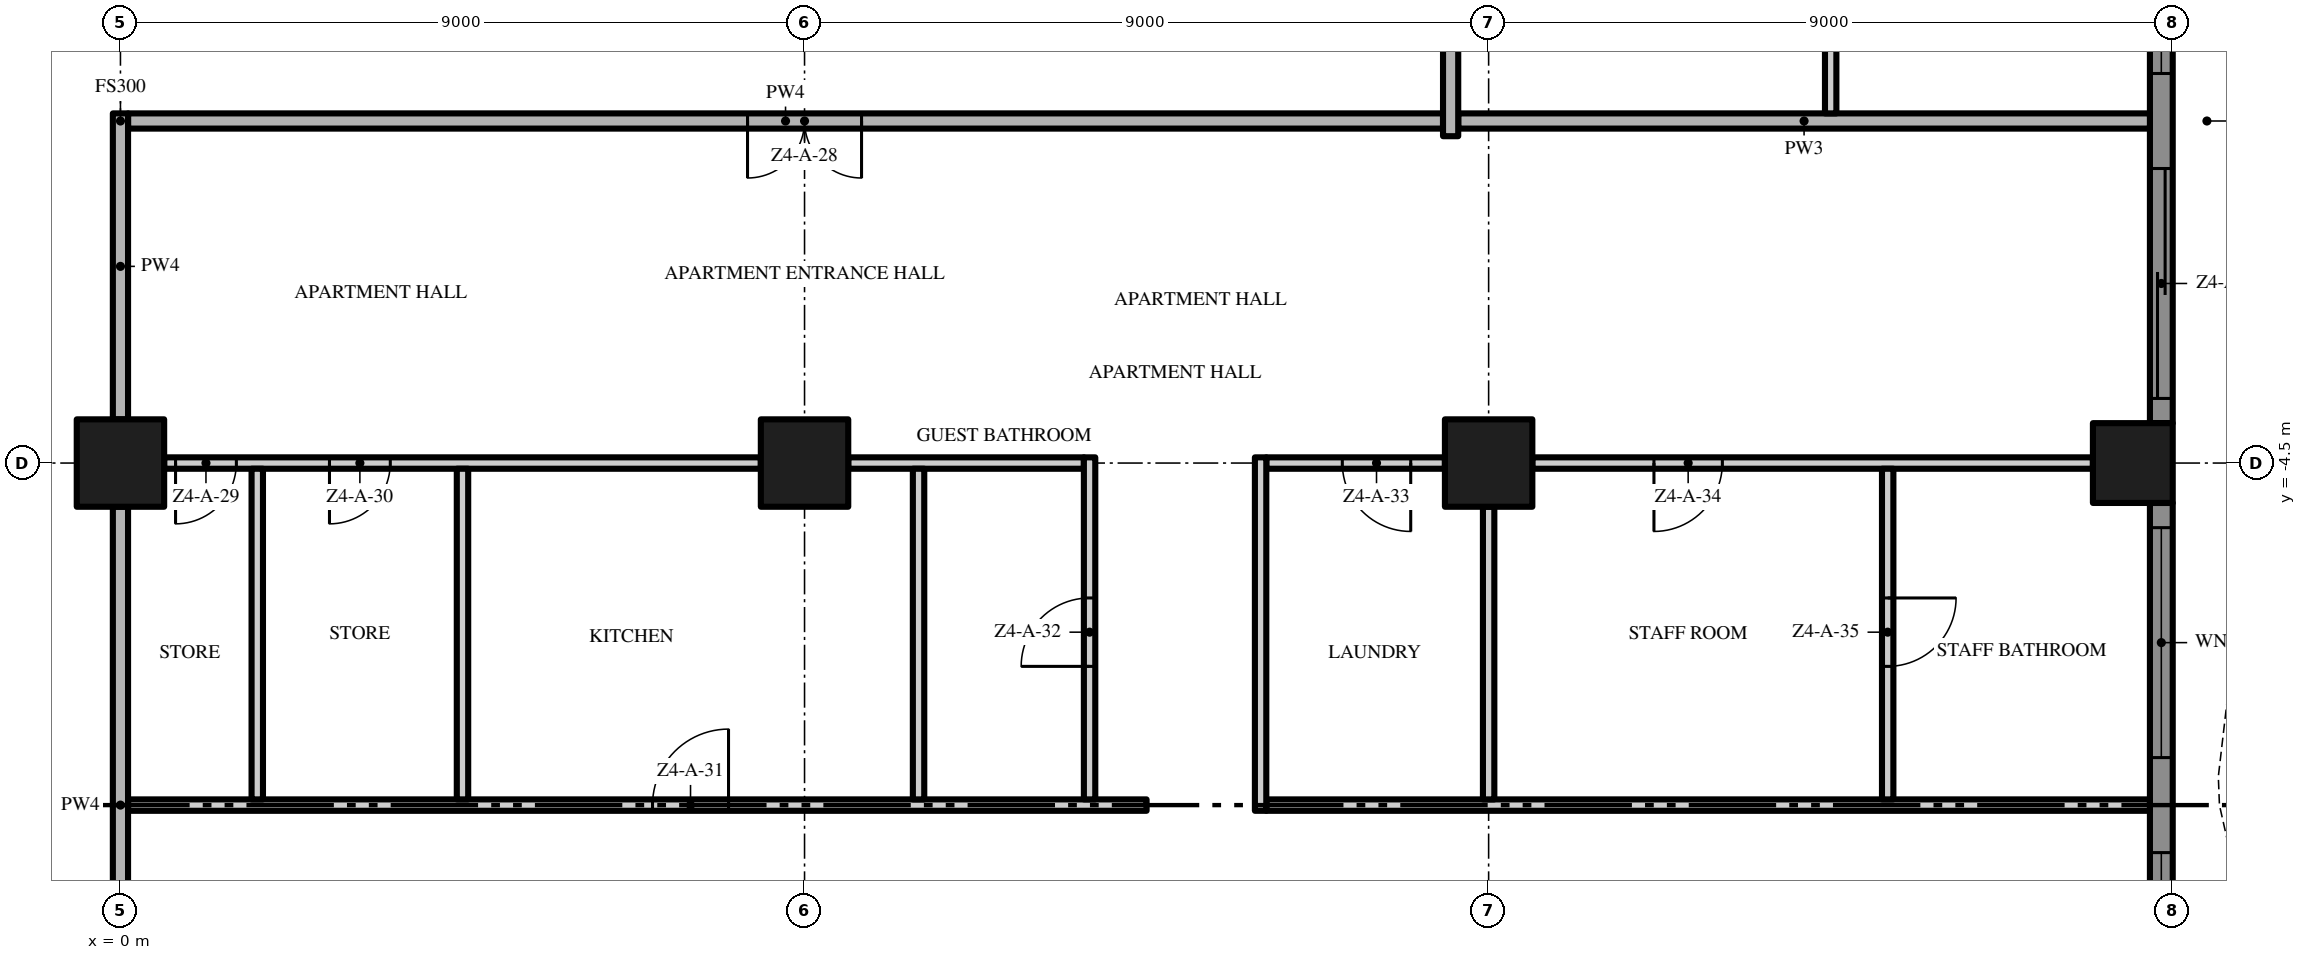
"""IFC4 building model, lengths in metres.
Left out: names, types, materials, properties, quantities, classifications, styles, units other than length and angle.
Written with IfcOpenShell. Run it as: python <this file> out.ifc"""

import sys

from ifc_helpers import new_model, si_unit, direction, frame, frame_2d, origin, origin_2d, place, context, subcontext, project, spatial, polyline, rectangle, outline, extrude, element, fill, save


model = new_model("IFC4")
c1 = context("Model", 3, precision=1e-05, world=origin(), true_north=direction((0.0, 1.0)))
c2 = subcontext(c1, "Body", "Model", "MODEL_VIEW")
j1 = project(units=[si_unit("LENGTHUNIT", "METRE"), si_unit("PLANEANGLEUNIT", "RADIAN")], contexts=[c1])
p1 = place(None, origin())
s1 = spatial("IfcSite", under=j1, at=p1, CompositionType="ELEMENT")
p2 = place(p1, origin())
s2 = spatial("IfcBuilding", under=s1, at=p2, CompositionType="ELEMENT")
p3 = place(p2, frame((0.0, 0.0, 184.4)))
s3 = spatial("IfcBuildingStorey", under=s2, at=p3, CompositionType="ELEMENT", Elevation=184.4)
for number, where, z_axis, x_axis in (
    (1, (0.0, -4.5, 0.0), (0.0, 0.0, 1.0), (1.0, 0.0, 0.0)),
    (2, (18.0, -4.5, 0.0), (0.0, 0.0, 1.0), (1.0, 0.0, 0.0)),
):
    element("IfcColumn", number, at=place(p3, frame(where, z_axis=z_axis, x_axis=x_axis)), inside=s3, PredefinedType="COLUMN", context=c2, shape_type="SweptSolid", body=[
        extrude(rectangle(XDim=1.15, YDim=1.15, at=origin_2d()), origin(), (0.0, 0.0, 1.0), 3.5),
    ])
p4 = place(p3, frame((26.475, -4.5, 0.0), z_axis=(0.0, 0.0, 1.0), x_axis=(1.0, 0.0, 0.0)))
e3 = element("IfcColumn", 3, at=p4, inside=s3, PredefinedType="COLUMN", context=c2, shape_type="SweptSolid", body=[
    extrude(rectangle(XDim=1.05, YDim=1.05, at=origin_2d()), origin(), (0.0, 0.0, 1.0), 3.5),
])
p5 = place(p3, frame((9.0, -4.5, 0.0), z_axis=(0.0, 0.0, 1.0), x_axis=(1.0, 0.0, 0.0)))
e4 = element("IfcColumn", 4, at=p5, inside=s3, PredefinedType="COLUMN", context=c2, shape_type="SweptSolid", body=[
    extrude(rectangle(XDim=1.15, YDim=1.15, at=origin_2d()), origin(), (0.0, 0.0, 1.0), 3.5),
])
p6 = place(p3, frame((26.85, -5.025, 0.0), z_axis=(0.0, 0.0, 1.0), x_axis=(0.0, -1.0, 0.0)))
e5 = element("IfcWall", 5, at=p6, inside=s3, PredefinedType="SOLIDWALL", context=c2, shape_type="SweptSolid", body=[
    extrude(rectangle(XDim=7.95, YDim=0.3, at=frame_2d((3.975, 0.0))), origin(), (0.0, 0.0, 1.0), 3.5),
])
p7 = place(p6, frame((4.6, 0.0, 0.45)))
e6 = element("IfcOpeningElement", 6, at=p7, cuts=e5, PredefinedType="OPENING", context=c2, shape_type="SweptSolid", body=[
    extrude(rectangle(XDim=3.025, YDim=2.65, at=frame_2d((1.512, 1.325))), frame((0.0, 0.16, 0.0), z_axis=(0.0, -1.0, 0.0), x_axis=(1.0, 0.0, 0.0)), (0.0, 0.0, 1.0), 0.32),
])
p8 = place(p6, frame((0.325, 0.0, 0.45)))
e7 = element("IfcOpeningElement", 7, at=p8, cuts=e5, PredefinedType="OPENING", context=c2, shape_type="SweptSolid", body=[
    extrude(rectangle(XDim=3.025, YDim=2.65, at=frame_2d((1.512, 1.325))), frame((0.0, 0.16, 0.0), z_axis=(0.0, -1.0, 0.0), x_axis=(1.0, 0.0, 0.0)), (0.0, 0.0, 1.0), 0.32),
])
p9 = place(p3, frame((26.85, 3.975, 0.0), z_axis=(0.0, 0.0, 1.0), x_axis=(0.0, -1.0, 0.0)))
e8 = element("IfcWall", 8, at=p9, inside=s3, PredefinedType="SOLIDWALL", context=c2, shape_type="SweptSolid", body=[
    extrude(rectangle(XDim=7.95, YDim=0.3, at=frame_2d((3.975, 0.0))), origin(), (0.0, 0.0, 1.0), 3.5),
])
p10 = place(p9, frame((4.6, 0.0, 0.0)))
e9 = element("IfcOpeningElement", 9, at=p10, cuts=e8, PredefinedType="OPENING", context=c2, shape_type="SweptSolid", body=[
    extrude(rectangle(XDim=3.025, YDim=2.4, at=frame_2d((1.512, 1.2))), frame((0.0, 0.16, 0.0), z_axis=(0.0, -1.0, 0.0), x_axis=(1.0, 0.0, 0.0)), (0.0, 0.0, 1.0), 0.32),
])
p11 = place(p9, frame((0.325, 0.0, 0.45)))
e10 = element("IfcOpeningElement", 10, at=p11, cuts=e8, PredefinedType="OPENING", context=c2, shape_type="SweptSolid", body=[
    extrude(rectangle(XDim=3.025, YDim=2.65, at=frame_2d((1.512, 1.325))), frame((0.0, 0.16, 0.0), z_axis=(0.0, -1.0, 0.0), x_axis=(1.0, 0.0, 0.0)), (0.0, 0.0, 1.0), 0.32),
])
p12 = place(p3, origin())
e11 = element("IfcWall", 11, at=p12, inside=s3, PredefinedType="USERDEFINED", context=c2, shape_type="SweptSolid", body=[
    extrude(outline(polyline([(29.649, -18.0), (29.985, -16.5), (30.0, -16.125), (29.869, -15.0), (29.345, -13.5), (28.612, -12.0), (27.951, -10.5), (27.615, -9.0), (27.6, -8.625), (27.731, -7.5), (28.255, -6.0), (28.988, -4.5), (29.649, -3.0), (29.985, -1.5), (30.0, -1.125), (29.869, 0.0), (29.345, 1.5), (28.612, 3.0), (27.951, 4.5), (27.615, 6.0), (27.6, 6.375), (27.731, 7.5), (28.255, 9.0), (28.988, 10.5), (29.649, 12.0), (29.985, 13.5), (30.0, 13.875), (29.869, 15.0), (29.345, 16.5), (28.612, 18.0), (28.388, 17.89), (29.114, 16.404), (29.624, 14.944), (29.749, 13.865), (29.736, 13.533), (29.41, 12.079), (28.761, 10.605), (28.024, 9.096), (27.486, 7.556), (27.349, 6.385), (27.366, 5.967), (27.713, 4.421), (28.385, 2.895), (29.114, 1.404), (29.624, -0.056), (29.749, -1.135), (29.736, -1.467), (29.41, -2.921), (28.761, -4.395), (28.024, -5.904), (27.486, -7.444), (27.349, -8.615), (27.366, -9.033), (27.713, -10.579), (28.385, -12.105), (29.114, -13.596), (29.624, -15.056), (29.749, -16.135), (29.736, -16.467), (29.405, -17.945), (29.649, -18.0)])), origin(), (0.0, 0.0, 1.0), 0.9),
])
p13 = place(p3, frame((0.1, -9.0, 0.0), z_axis=(0.0, 0.0, 1.0), x_axis=(1.0, 0.0, 0.0)))
e12 = element("IfcWall", 12, at=p13, inside=s3, PredefinedType="PARTITIONING", context=c2, shape_type="SweptSolid", body=[
    extrude(rectangle(XDim=13.4, YDim=0.15, at=frame_2d((6.7, 0.0))), origin(), (0.0, 0.0, 1.0), 3.5),
])
p14 = place(p13, frame((6.9, 0.0, 0.0)))
e13 = element("IfcOpeningElement", 13, at=p14, cuts=e12, PredefinedType="OPENING", context=c2, shape_type="SweptSolid", body=[
    extrude(rectangle(XDim=1.0, YDim=2.4, at=frame_2d((0.5, 1.2))), frame((0.0, 0.085, 0.0), z_axis=(0.0, -1.0, 0.0), x_axis=(1.0, 0.0, 0.0)), (0.0, 0.0, 1.0), 0.17),
])
p15 = place(p3, frame((15.075, -9.0, 0.0), z_axis=(0.0, 0.0, 1.0), x_axis=(1.0, 0.0, 0.0)))
e14 = element("IfcWall", 14, at=p15, inside=s3, PredefinedType="PARTITIONING", context=c2, shape_type="SweptSolid", body=[
    extrude(rectangle(XDim=11.625, YDim=0.15, at=frame_2d((5.812, 0.0))), origin(), (0.0, 0.0, 1.0), 3.5),
])
p16 = place(p3, frame((8.425, -4.5, 0.0), z_axis=(0.0, 0.0, 1.0), x_axis=(-1.0, 0.0, 0.0)))
e15 = element("IfcWall", 15, at=p16, inside=s3, PredefinedType="PARTITIONING", context=c2, shape_type="SweptSolid", body=[
    extrude(rectangle(XDim=7.85, YDim=0.15, at=frame_2d((3.925, 0.0))), origin(), (0.0, 0.0, 1.0), 3.5),
])
p17 = place(p16, frame((6.9, 0.0, 0.0)))
e16 = element("IfcOpeningElement", 16, at=p17, cuts=e15, PredefinedType="OPENING", context=c2, shape_type="SweptSolid", body=[
    extrude(rectangle(XDim=0.8, YDim=2.0, at=frame_2d((0.4, 1.0))), frame((0.0, 0.085, 0.0), z_axis=(0.0, -1.0, 0.0), x_axis=(1.0, 0.0, 0.0)), (0.0, 0.0, 1.0), 0.17),
])
p18 = place(p16, frame((4.875, 0.0, 0.0)))
e17 = element("IfcOpeningElement", 17, at=p18, cuts=e15, PredefinedType="OPENING", context=c2, shape_type="SweptSolid", body=[
    extrude(rectangle(XDim=0.8, YDim=2.0, at=frame_2d((0.4, 1.0))), frame((0.0, 0.085, 0.0), z_axis=(0.0, -1.0, 0.0), x_axis=(1.0, 0.0, 0.0)), (0.0, 0.0, 1.0), 0.17),
])
p19 = place(p3, frame((9.575, -4.5, 0.0), z_axis=(0.0, 0.0, 1.0), x_axis=(1.0, 0.0, 0.0)))
e18 = element("IfcWall", 18, at=p19, inside=s3, PredefinedType="PARTITIONING", context=c2, shape_type="SweptSolid", body=[
    extrude(rectangle(XDim=3.1, YDim=0.15, at=frame_2d((1.55, 0.0))), origin(), (0.0, 0.0, 1.0), 3.5),
])
p20 = place(p3, frame((17.425, -4.5, 0.0), z_axis=(0.0, 0.0, 1.0), x_axis=(-1.0, 0.0, 0.0)))
e19 = element("IfcWall", 19, at=p20, inside=s3, PredefinedType="PARTITIONING", context=c2, shape_type="SweptSolid", body=[
    extrude(rectangle(XDim=2.35, YDim=0.15, at=frame_2d((1.175, 0.0))), origin(), (0.0, 0.0, 1.0), 3.5),
])
p21 = place(p20, frame((0.45, 0.0, 0.0)))
e20 = element("IfcOpeningElement", 20, at=p21, cuts=e19, PredefinedType="OPENING", context=c2, shape_type="SweptSolid", body=[
    extrude(rectangle(XDim=0.9, YDim=2.1, at=frame_2d((0.45, 1.05))), frame((0.0, 0.085, 0.0), z_axis=(0.0, -1.0, 0.0), x_axis=(1.0, 0.0, 0.0)), (0.0, 0.0, 1.0), 0.17),
])
p22 = place(p3, frame((25.95, -4.5, 0.0), z_axis=(0.0, 0.0, 1.0), x_axis=(-1.0, 0.0, 0.0)))
e21 = element("IfcWall", 21, at=p22, inside=s3, PredefinedType="PARTITIONING", context=c2, shape_type="SweptSolid", body=[
    extrude(rectangle(XDim=7.375, YDim=0.15, at=frame_2d((3.688, 0.0))), origin(), (0.0, 0.0, 1.0), 3.5),
])
p23 = place(p22, frame((4.875, 0.0, 0.0)))
e22 = element("IfcOpeningElement", 22, at=p23, cuts=e21, PredefinedType="OPENING", context=c2, shape_type="SweptSolid", body=[
    extrude(rectangle(XDim=0.9, YDim=2.1, at=frame_2d((0.45, 1.05))), frame((0.0, 0.085, 0.0), z_axis=(0.0, -1.0, 0.0), x_axis=(1.0, 0.0, 0.0)), (0.0, 0.0, 1.0), 0.17),
])
p24 = place(p3, frame((17.4, 0.0, 0.0), z_axis=(0.0, 0.0, 1.0), x_axis=(-1.0, 0.0, 0.0)))
e23 = element("IfcWall", 23, at=p24, inside=s3, PredefinedType="PARTITIONING", context=c2, shape_type="SweptSolid", body=[
    extrude(rectangle(XDim=17.3, YDim=0.2, at=frame_2d((8.65, 0.0))), origin(), (0.0, 0.0, 1.0), 3.5),
])
p25 = place(p24, frame((7.65, 0.0, 0.0)))
e24 = element("IfcOpeningElement", 24, at=p25, cuts=e23, PredefinedType="OPENING", context=c2, shape_type="SweptSolid", body=[
    extrude(rectangle(XDim=1.5, YDim=2.4, at=frame_2d((0.75, 1.2))), frame((0.0, 0.11, 0.0), z_axis=(0.0, -1.0, 0.0), x_axis=(1.0, 0.0, 0.0)), (0.0, 0.0, 1.0), 0.22),
])
p26 = place(p3, frame((17.6, 0.0, 0.0), z_axis=(0.0, 0.0, 1.0), x_axis=(1.0, 0.0, 0.0)))
e25 = element("IfcWall", 25, at=p26, inside=s3, PredefinedType="PARTITIONING", context=c2, shape_type="SweptSolid", body=[
    extrude(rectangle(XDim=9.1, YDim=0.2, at=frame_2d((4.55, 0.0))), origin(), (0.0, 0.0, 1.0), 3.5),
])
p27 = place(p3, frame((0.0, -12.925, 0.0), z_axis=(0.0, 0.0, 1.0), x_axis=(0.0, 1.0, 0.0)))
e26 = element("IfcWall", 26, at=p27, inside=s3, PredefinedType="PARTITIONING", context=c2, shape_type="SweptSolid", body=[
    extrude(rectangle(XDim=7.85, YDim=0.2, at=frame_2d((3.925, 0.0))), origin(), (0.0, 0.0, 1.0), 3.5),
])
p28 = place(p3, frame((0.0, -3.925, 0.0), z_axis=(0.0, 0.0, 1.0), x_axis=(0.0, 1.0, 0.0)))
e27 = element("IfcWall", 27, at=p28, inside=s3, PredefinedType="PARTITIONING", context=c2, shape_type="SweptSolid", body=[
    extrude(rectangle(XDim=4.025, YDim=0.2, at=frame_2d((2.013, 0.0))), origin(), (0.0, 0.0, 1.0), 3.5),
])
for number, where, z_axis, x_axis in (
    (28, (1.8, -8.925, 0.0), (0.0, 0.0, 1.0), (0.0, 1.0, 0.0)),
    (29, (4.5, -8.925, 0.0), (0.0, 0.0, 1.0), (0.0, 1.0, 0.0)),
    (30, (10.5, -8.925, 0.0), (0.0, 0.0, 1.0), (0.0, 1.0, 0.0)),
):
    element("IfcWall", number, at=place(p3, frame(where, z_axis=z_axis, x_axis=x_axis)), inside=s3, PredefinedType="PARTITIONING", context=c2, shape_type="SweptSolid", body=[
        extrude(rectangle(XDim=4.35, YDim=0.15, at=frame_2d((2.175, 0.0))), origin(), (0.0, 0.0, 1.0), 3.5),
    ])
p29 = place(p3, frame((12.75, -8.925, 0.0), z_axis=(0.0, 0.0, 1.0), x_axis=(0.0, 1.0, 0.0)))
e31 = element("IfcWall", 31, at=p29, inside=s3, PredefinedType="PARTITIONING", context=c2, shape_type="SweptSolid", body=[
    extrude(rectangle(XDim=4.5, YDim=0.15, at=frame_2d((2.25, 0.0))), origin(), (0.0, 0.0, 1.0), 3.5),
])
p30 = place(p29, frame((1.75, 0.0, 0.0)))
e32 = element("IfcOpeningElement", 32, at=p30, cuts=e31, PredefinedType="OPENING", context=c2, shape_type="SweptSolid", body=[
    extrude(rectangle(XDim=0.9, YDim=2.1, at=frame_2d((0.45, 1.05))), frame((0.0, 0.085, 0.0), z_axis=(0.0, -1.0, 0.0), x_axis=(1.0, 0.0, 0.0)), (0.0, 0.0, 1.0), 0.17),
])
p31 = place(p3, frame((15.0, -9.075, 0.0), z_axis=(0.0, 0.0, 1.0), x_axis=(0.0, 1.0, 0.0)))
e33 = element("IfcWall", 33, at=p31, inside=s3, PredefinedType="PARTITIONING", context=c2, shape_type="SweptSolid", body=[
    extrude(rectangle(XDim=4.65, YDim=0.15, at=frame_2d((2.325, 0.0))), origin(), (0.0, 0.0, 1.0), 3.5),
])
p32 = place(p3, frame((17.5, -0.2, 0.0), z_axis=(0.0, 0.0, 1.0), x_axis=(0.0, 1.0, 0.0)))
e34 = element("IfcWall", 34, at=p32, inside=s3, PredefinedType="PARTITIONING", context=c2, shape_type="SweptSolid", body=[
    extrude(rectangle(XDim=4.125, YDim=0.2, at=frame_2d((2.062, 0.0))), origin(), (0.0, 0.0, 1.0), 3.5),
])
p33 = place(p3, frame((18.0, -8.925, 0.0), z_axis=(0.0, 0.0, 1.0), x_axis=(0.0, 1.0, 0.0)))
e35 = element("IfcWall", 35, at=p33, inside=s3, PredefinedType="PARTITIONING", context=c2, shape_type="SweptSolid", body=[
    extrude(rectangle(XDim=3.85, YDim=0.15, at=frame_2d((1.925, 0.0))), origin(), (0.0, 0.0, 1.0), 3.5),
])
p34 = place(p3, frame((22.5, 17.475, 0.0), z_axis=(0.0, 0.0, 1.0), x_axis=(0.0, -1.0, 0.0)))
e36 = element("IfcWall", 36, at=p34, inside=s3, PredefinedType="PARTITIONING", context=c2, shape_type="SweptSolid", body=[
    extrude(rectangle(XDim=17.375, YDim=0.15, at=frame_2d((8.688, 0.0))), origin(), (0.0, 0.0, 1.0), 3.5),
])
p35 = place(p34, frame((14.725, 0.0, 0.0)))
e37 = element("IfcOpeningElement", 37, at=p35, cuts=e36, PredefinedType="OPENING", context=c2, shape_type="SweptSolid", body=[
    extrude(rectangle(XDim=1.0, YDim=2.4, at=frame_2d((0.5, 1.2))), frame((0.0, 0.085, 0.0), z_axis=(0.0, -1.0, 0.0), x_axis=(1.0, 0.0, 0.0)), (0.0, 0.0, 1.0), 0.17),
])
p36 = place(p34, frame((9.125, 0.0, 0.0)))
e38 = element("IfcOpeningElement", 38, at=p36, cuts=e36, PredefinedType="OPENING", context=c2, shape_type="SweptSolid", body=[
    extrude(rectangle(XDim=1.0, YDim=2.4, at=frame_2d((0.5, 1.2))), frame((0.0, 0.085, 0.0), z_axis=(0.0, -1.0, 0.0), x_axis=(1.0, 0.0, 0.0)), (0.0, 0.0, 1.0), 0.17),
])
p37 = place(p34, frame((2.325, 0.0, 0.0)))
e39 = element("IfcOpeningElement", 39, at=p37, cuts=e36, PredefinedType="OPENING", context=c2, shape_type="SweptSolid", body=[
    extrude(rectangle(XDim=1.8, YDim=2.4, at=frame_2d((0.9, 1.2))), frame((0.0, 0.085, 0.0), z_axis=(0.0, -1.0, 0.0), x_axis=(1.0, 0.0, 0.0)), (0.0, 0.0, 1.0), 0.17),
])
p38 = place(p3, frame((23.25, -4.575, 0.0), z_axis=(0.0, 0.0, 1.0), x_axis=(0.0, -1.0, 0.0)))
e40 = element("IfcWall", 40, at=p38, inside=s3, PredefinedType="PARTITIONING", context=c2, shape_type="SweptSolid", body=[
    extrude(rectangle(XDim=4.35, YDim=0.15, at=frame_2d((2.175, 0.0))), origin(), (0.0, 0.0, 1.0), 3.5),
])
p39 = place(p38, frame((1.7, 0.0, 0.0)))
e41 = element("IfcOpeningElement", 41, at=p39, cuts=e40, PredefinedType="OPENING", context=c2, shape_type="SweptSolid", body=[
    extrude(rectangle(XDim=0.9, YDim=2.1, at=frame_2d((0.45, 1.05))), frame((0.0, 0.085, 0.0), z_axis=(0.0, -1.0, 0.0), x_axis=(1.0, 0.0, 0.0)), (0.0, 0.0, 1.0), 0.17),
])
p40 = place(p7, origin())
e42 = element("IfcWindow", 42, at=p40, inside=s3, PartitioningType="SINGLE_PANEL", PredefinedType="WINDOW", context=c2, shape_type="SweptSolid", body=[
    extrude(rectangle(XDim=3.025, YDim=2.65, at=frame_2d((1.512, 1.325))), frame((0.0, 0.03, 0.0), z_axis=(0.0, -1.0, 0.0), x_axis=(1.0, 0.0, 0.0)), (0.0, 0.0, 1.0), 0.06),
])
fill(e6, e42)
p41 = place(p8, origin())
e43 = element("IfcWindow", 43, at=p41, inside=s3, PartitioningType="SINGLE_PANEL", PredefinedType="WINDOW", context=c2, shape_type="SweptSolid", body=[
    extrude(rectangle(XDim=3.025, YDim=2.65, at=frame_2d((1.512, 1.325))), frame((0.0, 0.03, 0.0), z_axis=(0.0, -1.0, 0.0), x_axis=(1.0, 0.0, 0.0)), (0.0, 0.0, 1.0), 0.06),
])
fill(e7, e43)
p42 = place(p10, origin())
e44 = element("IfcDoor", 44, at=p42, inside=s3, OperationType="SINGLE_SWING_LEFT", PredefinedType="DOOR", context=c2, shape_type="SweptSolid", body=[
    extrude(rectangle(XDim=3.025, YDim=2.4, at=frame_2d((1.512, 1.2))), frame((0.0, 0.025, 0.0), z_axis=(0.0, -1.0, 0.0), x_axis=(1.0, 0.0, 0.0)), (0.0, 0.0, 1.0), 0.05),
])
fill(e9, e44)
p43 = place(p11, origin())
e45 = element("IfcWindow", 45, at=p43, inside=s3, PartitioningType="SINGLE_PANEL", PredefinedType="WINDOW", context=c2, shape_type="SweptSolid", body=[
    extrude(rectangle(XDim=3.025, YDim=2.65, at=frame_2d((1.512, 1.325))), frame((0.0, 0.03, 0.0), z_axis=(0.0, -1.0, 0.0), x_axis=(1.0, 0.0, 0.0)), (0.0, 0.0, 1.0), 0.06),
])
fill(e10, e45)
p44 = place(p25, origin())
e46 = element("IfcDoor", 46, at=p44, inside=s3, OperationType="DOUBLE_DOOR_SINGLE_SWING", PredefinedType="DOOR", context=c2, shape_type="SweptSolid", body=[
    extrude(rectangle(XDim=1.5, YDim=2.4, at=frame_2d((0.75, 1.2))), frame((0.0, 0.025, 0.0), z_axis=(0.0, -1.0, 0.0), x_axis=(1.0, 0.0, 0.0)), (0.0, 0.0, 1.0), 0.05),
])
fill(e24, e46)
p45 = place(p17, origin())
e47 = element("IfcDoor", 47, at=p45, inside=s3, OperationType="SINGLE_SWING_RIGHT", PredefinedType="DOOR", context=c2, shape_type="SweptSolid", body=[
    extrude(rectangle(XDim=0.8, YDim=2.0, at=frame_2d((0.4, 1.0))), frame((0.0, 0.025, 0.0), z_axis=(0.0, -1.0, 0.0), x_axis=(1.0, 0.0, 0.0)), (0.0, 0.0, 1.0), 0.05),
])
fill(e16, e47)
p46 = place(p18, origin())
e48 = element("IfcDoor", 48, at=p46, inside=s3, OperationType="SINGLE_SWING_RIGHT", PredefinedType="DOOR", context=c2, shape_type="SweptSolid", body=[
    extrude(rectangle(XDim=0.8, YDim=2.0, at=frame_2d((0.4, 1.0))), frame((0.0, 0.025, 0.0), z_axis=(0.0, -1.0, 0.0), x_axis=(1.0, 0.0, 0.0)), (0.0, 0.0, 1.0), 0.05),
])
fill(e17, e48)
p47 = place(p14, origin())
e49 = element("IfcDoor", 49, at=p47, inside=s3, OperationType="SINGLE_SWING_RIGHT", PredefinedType="DOOR", context=c2, shape_type="SweptSolid", body=[
    extrude(rectangle(XDim=1.0, YDim=2.4, at=frame_2d((0.5, 1.2))), frame((0.0, 0.025, 0.0), z_axis=(0.0, -1.0, 0.0), x_axis=(1.0, 0.0, 0.0)), (0.0, 0.0, 1.0), 0.05),
])
fill(e13, e49)
p48 = place(p30, origin())
e50 = element("IfcDoor", 50, at=p48, inside=s3, OperationType="SINGLE_SWING_LEFT", PredefinedType="DOOR", context=c2, shape_type="SweptSolid", body=[
    extrude(rectangle(XDim=0.9, YDim=2.1, at=frame_2d((0.45, 1.05))), frame((0.0, 0.025, 0.0), z_axis=(0.0, -1.0, 0.0), x_axis=(1.0, 0.0, 0.0)), (0.0, 0.0, 1.0), 0.05),
])
fill(e32, e50)
p49 = place(p21, origin())
e51 = element("IfcDoor", 51, at=p49, inside=s3, OperationType="SINGLE_SWING_LEFT", PredefinedType="DOOR", context=c2, shape_type="SweptSolid", body=[
    extrude(rectangle(XDim=0.9, YDim=2.1, at=frame_2d((0.45, 1.05))), frame((0.0, 0.025, 0.0), z_axis=(0.0, -1.0, 0.0), x_axis=(1.0, 0.0, 0.0)), (0.0, 0.0, 1.0), 0.05),
])
fill(e20, e51)
p50 = place(p23, origin())
e52 = element("IfcDoor", 52, at=p50, inside=s3, OperationType="SINGLE_SWING_RIGHT", PredefinedType="DOOR", context=c2, shape_type="SweptSolid", body=[
    extrude(rectangle(XDim=0.9, YDim=2.1, at=frame_2d((0.45, 1.05))), frame((0.0, 0.025, 0.0), z_axis=(0.0, -1.0, 0.0), x_axis=(1.0, 0.0, 0.0)), (0.0, 0.0, 1.0), 0.05),
])
fill(e22, e52)
p51 = place(p39, origin())
e53 = element("IfcDoor", 53, at=p51, inside=s3, OperationType="SINGLE_SWING_LEFT", PredefinedType="DOOR", context=c2, shape_type="SweptSolid", body=[
    extrude(rectangle(XDim=0.9, YDim=2.1, at=frame_2d((0.45, 1.05))), frame((0.0, 0.025, 0.0), z_axis=(0.0, -1.0, 0.0), x_axis=(1.0, 0.0, 0.0)), (0.0, 0.0, 1.0), 0.05),
])
fill(e41, e53)
save(model, sys.argv[1])
